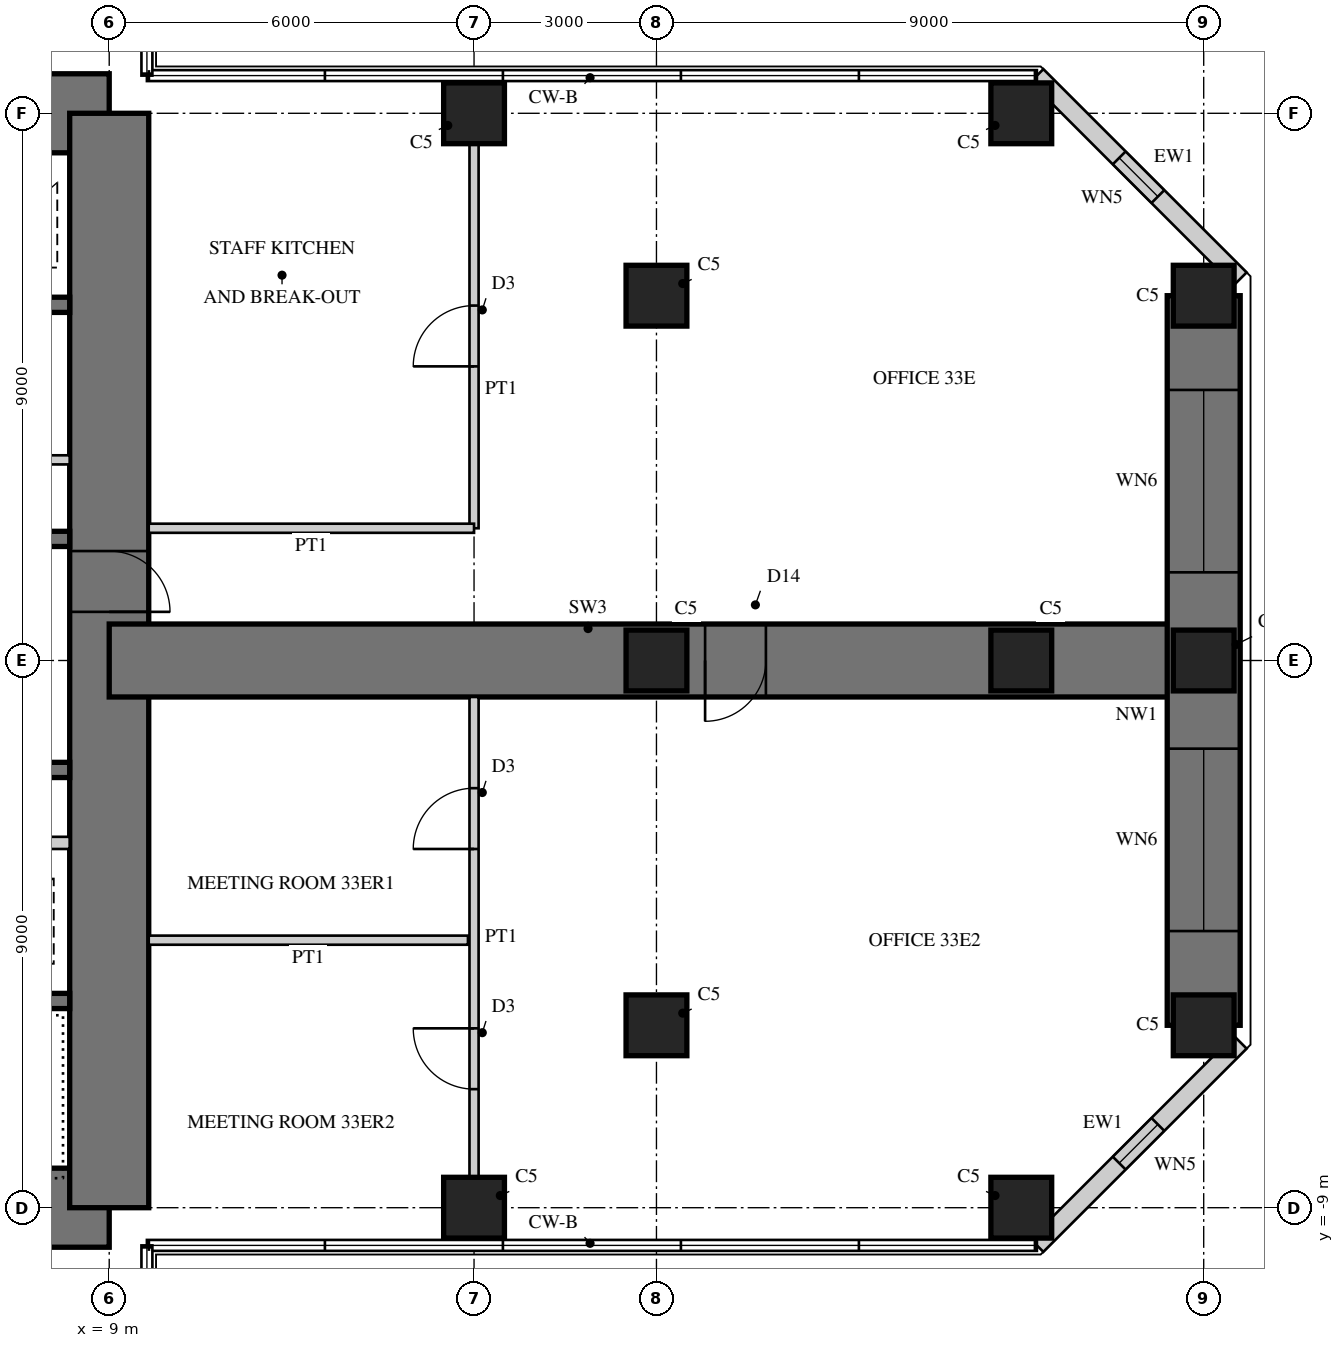
"""IFC4 building model, lengths in metres.
Left out: names, types, materials, properties, quantities, classifications, styles, units other than length and angle.
Written with IfcOpenShell. Run it as: python <this file> out.ifc"""

import sys

from ifc_helpers import new_model, si_unit, direction, frame, frame_2d, origin, origin_2d, place, context, subcontext, project, spatial, rectangle, hollow_rectangle, extrude, element, fill, save


model = new_model("IFC4")
c1 = context("Model", 3, precision=1e-05, world=origin(), true_north=direction((0.0, 1.0)))
c2 = subcontext(c1, "Body", "Model", "MODEL_VIEW")
j1 = project(units=[si_unit("LENGTHUNIT", "METRE"), si_unit("PLANEANGLEUNIT", "RADIAN")], contexts=[c1])
p1 = place(None, origin())
s1 = spatial("IfcSite", under=j1, at=p1, CompositionType="ELEMENT")
p2 = place(p1, origin())
s2 = spatial("IfcBuilding", under=s1, at=p2, CompositionType="ELEMENT")
p3 = place(p2, frame((0.0, 0.0, 136.5)))
s3 = spatial("IfcBuildingStorey", under=s2, at=p3, CompositionType="ELEMENT", Elevation=136.5)
p4 = place(p3, frame((9.0, 9.0, 0.0), z_axis=(0.0, 0.0, 1.0), x_axis=(-1.0, 0.0, 0.0)))
e1 = element("IfcWall", 1, at=p4, inside=s3, PredefinedType="SHEAR", context=c2, shape_type="SweptSolid", body=[
    extrude(rectangle(XDim=18.0, YDim=1.3, at=frame_2d((9.0, 0.0))), origin(), (0.0, 0.0, 1.0), 4.0),
])
p5 = place(p4, frame((9.8, 0.0, 0.0)))
e2 = element("IfcOpeningElement", 2, at=p5, cuts=e1, PredefinedType="OPENING", context=c2, shape_type="SweptSolid", body=[
    extrude(rectangle(XDim=1.0, YDim=2.4, at=frame_2d((0.5, 1.2))), frame((0.0, 0.66, 0.0), z_axis=(0.0, -1.0, 0.0), x_axis=(1.0, 0.0, 0.0)), (0.0, 0.0, 1.0), 1.32),
])
p6 = place(p3, frame((-9.0, -9.0, 0.0), z_axis=(0.0, 0.0, 1.0), x_axis=(1.0, 0.0, 0.0)))
e3 = element("IfcWall", 3, at=p6, inside=s3, PredefinedType="SHEAR", context=c2, shape_type="SweptSolid", body=[
    extrude(rectangle(XDim=18.0, YDim=1.3, at=frame_2d((9.0, 0.0))), origin(), (0.0, 0.0, 1.0), 4.0),
])
p7 = place(p6, frame((9.8, 0.0, 0.0)))
e4 = element("IfcOpeningElement", 4, at=p7, cuts=e3, PredefinedType="OPENING", context=c2, shape_type="SweptSolid", body=[
    extrude(rectangle(XDim=1.0, YDim=2.4, at=frame_2d((0.5, 1.2))), frame((0.0, 0.66, 0.0), z_axis=(0.0, -1.0, 0.0), x_axis=(1.0, 0.0, 0.0)), (0.0, 0.0, 1.0), 1.32),
])
p8 = place(p3, frame((9.0, -9.0, 0.0), z_axis=(0.0, 0.0, 1.0), x_axis=(0.0, 1.0, 0.0)))
e5 = element("IfcWall", 5, at=p8, inside=s3, PredefinedType="SHEAR", context=c2, shape_type="SweptSolid", body=[
    extrude(rectangle(XDim=18.0, YDim=1.3, at=frame_2d((9.0, 0.0))), origin(), (0.0, 0.0, 1.0), 4.0),
])
p9 = place(p8, frame((9.8, 0.0, 0.0)))
e6 = element("IfcOpeningElement", 6, at=p9, cuts=e5, PredefinedType="OPENING", context=c2, shape_type="SweptSolid", body=[
    extrude(rectangle(XDim=1.0, YDim=2.4, at=frame_2d((0.5, 1.2))), frame((0.0, 0.66, 0.0), z_axis=(0.0, -1.0, 0.0), x_axis=(1.0, 0.0, 0.0)), (0.0, 0.0, 1.0), 1.32),
])
p10 = place(p3, frame((1.925, 2.0, 0.0), z_axis=(0.0, 0.0, 1.0), x_axis=(1.0, 0.0, 0.0)))
e7 = element("IfcWall", 7, at=p10, inside=s3, PredefinedType="SHEAR", context=c2, shape_type="SweptSolid", body=[
    extrude(rectangle(XDim=6.425, YDim=0.25, at=frame_2d((3.212, 0.0))), origin(), (0.0, 0.0, 1.0), 4.0),
])
p11 = place(p3, frame((1.925, 5.85, 0.0), z_axis=(0.0, 0.0, 1.0), x_axis=(1.0, 0.0, 0.0)))
e8 = element("IfcWall", 8, at=p11, inside=s3, PredefinedType="SHEAR", context=c2, shape_type="SweptSolid", body=[
    extrude(rectangle(XDim=6.425, YDim=0.25, at=frame_2d((3.212, 0.0))), origin(), (0.0, 0.0, 1.0), 4.0),
])
p12 = place(p11, frame((0.454, 0.0, 0.0)))
e9 = element("IfcOpeningElement", 9, at=p12, cuts=e8, PredefinedType="OPENING", context=c2, shape_type="SweptSolid", body=[
    extrude(rectangle(XDim=1.1, YDim=2.2, at=frame_2d((0.55, 1.1))), frame((0.0, 0.135, 0.0), z_axis=(0.0, -1.0, 0.0), x_axis=(1.0, 0.0, 0.0)), (0.0, 0.0, 1.0), 0.27),
])
p13 = place(p11, frame((2.663, 0.0, 0.0)))
e10 = element("IfcOpeningElement", 10, at=p13, cuts=e8, PredefinedType="OPENING", context=c2, shape_type="SweptSolid", body=[
    extrude(rectangle(XDim=1.1, YDim=2.2, at=frame_2d((0.55, 1.1))), frame((0.0, 0.135, 0.0), z_axis=(0.0, -1.0, 0.0), x_axis=(1.0, 0.0, 0.0)), (0.0, 0.0, 1.0), 0.27),
])
p14 = place(p11, frame((4.871, 0.0, 0.0)))
e11 = element("IfcOpeningElement", 11, at=p14, cuts=e8, PredefinedType="OPENING", context=c2, shape_type="SweptSolid", body=[
    extrude(rectangle(XDim=1.1, YDim=2.2, at=frame_2d((0.55, 1.1))), frame((0.0, 0.135, 0.0), z_axis=(0.0, -1.0, 0.0), x_axis=(1.0, 0.0, 0.0)), (0.0, 0.0, 1.0), 0.27),
])
p15 = place(p3, frame((1.925, 3.3, 0.0), z_axis=(0.0, 0.0, 1.0), x_axis=(1.0, 0.0, 0.0)))
e12 = element("IfcWall", 12, at=p15, inside=s3, PredefinedType="PARTITIONING", context=c2, shape_type="SweptSolid", body=[
    extrude(rectangle(XDim=6.425, YDim=0.15, at=frame_2d((3.212, 0.0))), origin(), (0.0, 0.0, 1.0), 4.0),
])
p16 = place(p15, frame((0.075, 0.0, 0.0)))
e13 = element("IfcOpeningElement", 13, at=p16, cuts=e12, PredefinedType="OPENING", context=c2, shape_type="SweptSolid", body=[
    extrude(rectangle(XDim=0.8, YDim=2.1, at=frame_2d((0.4, 1.05))), frame((0.0, 0.085, 0.0), z_axis=(0.0, -1.0, 0.0), x_axis=(1.0, 0.0, 0.0)), (0.0, 0.0, 1.0), 0.17),
])
p17 = place(p15, frame((3.675, 0.0, 0.0)))
e14 = element("IfcOpeningElement", 14, at=p17, cuts=e12, PredefinedType="OPENING", context=c2, shape_type="SweptSolid", body=[
    extrude(rectangle(XDim=0.8, YDim=2.1, at=frame_2d((0.4, 1.05))), frame((0.0, 0.085, 0.0), z_axis=(0.0, -1.0, 0.0), x_axis=(1.0, 0.0, 0.0)), (0.0, 0.0, 1.0), 0.17),
])
p18 = place(p3, frame((2.125, -1.8, 0.0), z_axis=(0.0, 0.0, 1.0), x_axis=(1.0, 0.0, 0.0)))
e15 = element("IfcWall", 15, at=p18, inside=s3, PredefinedType="SHEAR", context=c2, shape_type="SweptSolid", body=[
    extrude(rectangle(XDim=6.225, YDim=0.25, at=frame_2d((3.113, 0.0))), origin(), (0.0, 0.0, 1.0), 4.0),
])
p19 = place(p3, frame((2.125, -5.6, 0.0), z_axis=(0.0, 0.0, 1.0), x_axis=(1.0, 0.0, 0.0)))
e16 = element("IfcWall", 16, at=p19, inside=s3, PredefinedType="SHEAR", context=c2, shape_type="SweptSolid", body=[
    extrude(rectangle(XDim=6.225, YDim=0.25, at=frame_2d((3.113, 0.0))), origin(), (0.0, 0.0, 1.0), 4.0),
])
p20 = place(p19, frame((0.175, 0.0, 0.0)))
e17 = element("IfcOpeningElement", 17, at=p20, cuts=e16, PredefinedType="OPENING", context=c2, shape_type="SweptSolid", body=[
    extrude(rectangle(XDim=1.0, YDim=2.1, at=frame_2d((0.5, 1.05))), frame((0.0, 0.135, 0.0), z_axis=(0.0, -1.0, 0.0), x_axis=(1.0, 0.0, 0.0)), (0.0, 0.0, 1.0), 0.27),
])
p21 = place(p3, frame((5.725, -3.0, 0.0), z_axis=(0.0, 0.0, 1.0), x_axis=(1.0, 0.0, 0.0)))
e18 = element("IfcWall", 18, at=p21, inside=s3, PredefinedType="PARTITIONING", context=c2, shape_type="SweptSolid", body=[
    extrude(rectangle(XDim=2.625, YDim=0.2, at=frame_2d((1.312, 0.0))), origin(), (0.0, 0.0, 1.0), 4.0),
])
p22 = place(p3, frame((9.0, 0.0, 0.0), z_axis=(0.0, 0.0, 1.0), x_axis=(1.0, 0.0, 0.0)))
e19 = element("IfcWall", 19, at=p22, inside=s3, PredefinedType="SHEAR", context=c2, shape_type="SweptSolid", body=[
    extrude(rectangle(XDim=18.0, YDim=1.2, at=frame_2d((9.0, 0.0))), origin(), (0.0, 0.0, 1.0), 4.0),
])
p23 = place(p22, frame((9.8, 0.0, 0.0)))
e20 = element("IfcOpeningElement", 20, at=p23, cuts=e19, PredefinedType="OPENING", context=c2, shape_type="SweptSolid", body=[
    extrude(rectangle(XDim=1.0, YDim=2.2, at=frame_2d((0.5, 1.1))), frame((0.0, 0.61, 0.0), z_axis=(0.0, -1.0, 0.0), x_axis=(1.0, 0.0, 0.0)), (0.0, 0.0, 1.0), 1.22),
])
p24 = place(p3, frame((27.0, -6.0, 0.0), z_axis=(0.0, 0.0, 1.0), x_axis=(0.0, 1.0, 0.0)))
e21 = element("IfcWall", 21, at=p24, inside=s3, PredefinedType="SHEAR", context=c2, shape_type="SweptSolid", body=[
    extrude(rectangle(XDim=12.0, YDim=1.2, at=frame_2d((6.0, 0.0))), origin(), (0.0, 0.0, 1.0), 4.0),
])
p25 = place(p24, frame((1.55, 0.0, 0.6)))
e22 = element("IfcOpeningElement", 22, at=p25, cuts=e21, PredefinedType="OPENING", context=c2, shape_type="SweptSolid", body=[
    extrude(rectangle(XDim=3.0, YDim=2.4, at=frame_2d((1.5, 1.2))), frame((0.0, 0.61, 0.0), z_axis=(0.0, -1.0, 0.0), x_axis=(1.0, 0.0, 0.0)), (0.0, 0.0, 1.0), 1.22),
])
p26 = place(p24, frame((7.45, 0.0, 0.6)))
e23 = element("IfcOpeningElement", 23, at=p26, cuts=e21, PredefinedType="OPENING", context=c2, shape_type="SweptSolid", body=[
    extrude(rectangle(XDim=3.0, YDim=2.4, at=frame_2d((1.5, 1.2))), frame((0.0, 0.61, 0.0), z_axis=(0.0, -1.0, 0.0), x_axis=(1.0, 0.0, 0.0)), (0.0, 0.0, 1.0), 1.22),
])
for number, where, z_axis, x_axis in (
    (24, (15.0, -9.0, 0.0), (0.0, 0.0, 1.0), (1.0, 0.0, 0.0)),
    (25, (24.0, -9.0, 0.0), (0.0, 0.0, 1.0), (1.0, 0.0, 0.0)),
    (26, (15.0, 9.0, 0.0), (0.0, 0.0, 1.0), (1.0, 0.0, 0.0)),
    (27, (24.0, 9.0, 0.0), (0.0, 0.0, 1.0), (1.0, 0.0, 0.0)),
    (28, (27.0, -6.0, 0.0), (0.0, 0.0, 1.0), (1.0, 0.0, 0.0)),
    (29, (27.0, 0.0, 0.0), (0.0, 0.0, 1.0), (1.0, 0.0, 0.0)),
    (30, (27.0, 6.0, 0.0), (0.0, 0.0, 1.0), (1.0, 0.0, 0.0)),
    (31, (18.0, -6.0, 0.0), (0.0, 0.0, 1.0), (1.0, 0.0, 0.0)),
    (32, (18.0, 0.0, 0.0), (0.0, 0.0, 1.0), (1.0, 0.0, 0.0)),
    (33, (18.0, 6.0, 0.0), (0.0, 0.0, 1.0), (1.0, 0.0, 0.0)),
    (34, (24.0, 0.0, 0.0), (0.0, 0.0, 1.0), (1.0, 0.0, 0.0)),
):
    element("IfcColumn", number, at=place(p3, frame(where, z_axis=z_axis, x_axis=x_axis)), inside=s3, PredefinedType="COLUMN", context=c2, shape_type="SweptSolid", body=[
        extrude(rectangle(XDim=1.0, YDim=1.0, at=origin_2d()), origin(), (0.0, 0.0, 1.0), 4.0),
    ])
p27 = place(p3, frame((24.257, -9.62, 0.0), z_axis=(0.0, 0.0, 1.0), x_axis=(0.707106781187, 0.707106781187, 0.0)))
e35 = element("IfcWall", 35, at=p27, inside=s3, PredefinedType="SOLIDWALL", context=c2, shape_type="SweptSolid", body=[
    extrude(rectangle(XDim=4.728, YDim=0.3, at=frame_2d((2.364, 0.0))), origin(), (0.0, 0.0, 1.0), 3.8),
])
p28 = place(p27, frame((1.914, 0.0, 0.3)))
e36 = element("IfcOpeningElement", 36, at=p28, cuts=e35, PredefinedType="OPENING", context=c2, shape_type="SweptSolid", body=[
    extrude(rectangle(XDim=0.9, YDim=2.4, at=frame_2d((0.45, 1.2))), frame((0.0, 0.16, 0.0), z_axis=(0.0, -1.0, 0.0), x_axis=(1.0, 0.0, 0.0)), (0.0, 0.0, 1.0), 0.32),
])
p29 = place(p3, frame((27.6, 6.277, 0.0), z_axis=(0.0, 0.0, 1.0), x_axis=(-0.707106781187, 0.707106781187, 0.0)))
e37 = element("IfcWall", 37, at=p29, inside=s3, PredefinedType="SOLIDWALL", context=c2, shape_type="SweptSolid", body=[
    extrude(rectangle(XDim=4.728, YDim=0.3, at=frame_2d((2.364, 0.0))), origin(), (0.0, 0.0, 1.0), 3.8),
])
p30 = place(p29, frame((1.914, 0.0, 0.3)))
e38 = element("IfcOpeningElement", 38, at=p30, cuts=e37, PredefinedType="OPENING", context=c2, shape_type="SweptSolid", body=[
    extrude(rectangle(XDim=0.9, YDim=2.4, at=frame_2d((0.45, 1.2))), frame((0.0, 0.16, 0.0), z_axis=(0.0, -1.0, 0.0), x_axis=(1.0, 0.0, 0.0)), (0.0, 0.0, 1.0), 0.32),
])
p31 = place(p3, frame((15.0, 2.175, 0.0), z_axis=(0.0, 0.0, 1.0), x_axis=(0.0, 1.0, 0.0)))
e39 = element("IfcWall", 39, at=p31, inside=s3, PredefinedType="PARTITIONING", context=c2, shape_type="SweptSolid", body=[
    extrude(rectangle(XDim=6.325, YDim=0.15, at=frame_2d((3.163, 0.0))), origin(), (0.0, 0.0, 1.0), 3.0),
])
p32 = place(p31, frame((2.663, 0.0, 0.0)))
e40 = element("IfcOpeningElement", 40, at=p32, cuts=e39, PredefinedType="OPENING", context=c2, shape_type="SweptSolid", body=[
    extrude(rectangle(XDim=1.0, YDim=2.1, at=frame_2d((0.5, 1.05))), frame((0.0, 0.085, 0.0), z_axis=(0.0, -1.0, 0.0), x_axis=(1.0, 0.0, 0.0)), (0.0, 0.0, 1.0), 0.17),
])
p33 = place(p3, frame((9.65, 2.175, 0.0), z_axis=(0.0, 0.0, 1.0), x_axis=(1.0, 0.0, 0.0)))
e41 = element("IfcWall", 41, at=p33, inside=s3, PredefinedType="PARTITIONING", context=c2, shape_type="SweptSolid", body=[
    extrude(rectangle(XDim=5.35, YDim=0.15, at=frame_2d((2.675, 0.0))), origin(), (0.0, 0.0, 1.0), 3.8),
])
p34 = place(p3, frame((15.0, -8.5, 0.0), z_axis=(0.0, 0.0, 1.0), x_axis=(0.0, 1.0, 0.0)))
e42 = element("IfcWall", 42, at=p34, inside=s3, PredefinedType="PARTITIONING", context=c2, shape_type="SweptSolid", body=[
    extrude(rectangle(XDim=7.9, YDim=0.15, at=frame_2d((3.95, 0.0))), origin(), (0.0, 0.0, 1.0), 3.0),
])
p35 = place(p34, frame((1.45, 0.0, 0.0)))
e43 = element("IfcOpeningElement", 43, at=p35, cuts=e42, PredefinedType="OPENING", context=c2, shape_type="SweptSolid", body=[
    extrude(rectangle(XDim=1.0, YDim=2.1, at=frame_2d((0.5, 1.05))), frame((0.0, 0.085, 0.0), z_axis=(0.0, -1.0, 0.0), x_axis=(1.0, 0.0, 0.0)), (0.0, 0.0, 1.0), 0.17),
])
p36 = place(p34, frame((5.4, 0.0, 0.0)))
e44 = element("IfcOpeningElement", 44, at=p36, cuts=e42, PredefinedType="OPENING", context=c2, shape_type="SweptSolid", body=[
    extrude(rectangle(XDim=1.0, YDim=2.1, at=frame_2d((0.5, 1.05))), frame((0.0, 0.085, 0.0), z_axis=(0.0, -1.0, 0.0), x_axis=(1.0, 0.0, 0.0)), (0.0, 0.0, 1.0), 0.17),
])
p37 = place(p3, frame((9.65, -4.6, 0.0), z_axis=(0.0, 0.0, 1.0), x_axis=(1.0, 0.0, 0.0)))
e45 = element("IfcWall", 45, at=p37, inside=s3, PredefinedType="PARTITIONING", context=c2, shape_type="SweptSolid", body=[
    extrude(rectangle(XDim=5.25, YDim=0.15, at=frame_2d((2.625, 0.0))), origin(), (0.0, 0.0, 1.0), 3.8),
])
p38 = place(p28, origin())
e46 = element("IfcWindow", 46, at=p38, inside=s3, PartitioningType="SINGLE_PANEL", PredefinedType="WINDOW", context=c2, shape_type="SweptSolid", body=[
    extrude(hollow_rectangle(XDim=0.9, YDim=2.4, WallThickness=0.06, at=frame_2d((0.45, 1.2))), frame((0.0, 0.03, 0.0), z_axis=(0.0, -1.0, 0.0), x_axis=(1.0, 0.0, 0.0)), (0.0, 0.0, 1.0), 0.06),
    extrude(rectangle(XDim=0.779, YDim=2.279, at=frame_2d((0.45, 1.2))), frame((0.0, 0.03, 0.0), z_axis=(0.0, -1.0, 0.0), x_axis=(1.0, 0.0, 0.0)), (0.0, 0.0, 1.0), 0.06),
])
fill(e36, e46)
p39 = place(p25, origin())
e47 = element("IfcWindow", 47, at=p39, inside=s3, PartitioningType="SINGLE_PANEL", PredefinedType="WINDOW", context=c2, shape_type="SweptSolid", body=[
    extrude(hollow_rectangle(XDim=3.0, YDim=2.4, WallThickness=0.06, at=frame_2d((1.5, 1.2))), frame((0.0, 0.03, 0.0), z_axis=(0.0, -1.0, 0.0), x_axis=(1.0, 0.0, 0.0)), (0.0, 0.0, 1.0), 0.06),
    extrude(rectangle(XDim=2.879, YDim=2.279, at=frame_2d((1.5, 1.2))), frame((0.0, 0.03, 0.0), z_axis=(0.0, -1.0, 0.0), x_axis=(1.0, 0.0, 0.0)), (0.0, 0.0, 1.0), 0.06),
])
fill(e22, e47)
p40 = place(p26, origin())
e48 = element("IfcWindow", 48, at=p40, inside=s3, PartitioningType="SINGLE_PANEL", PredefinedType="WINDOW", context=c2, shape_type="SweptSolid", body=[
    extrude(hollow_rectangle(XDim=3.0, YDim=2.4, WallThickness=0.06, at=frame_2d((1.5, 1.2))), frame((0.0, 0.03, 0.0), z_axis=(0.0, -1.0, 0.0), x_axis=(1.0, 0.0, 0.0)), (0.0, 0.0, 1.0), 0.06),
    extrude(rectangle(XDim=2.879, YDim=2.279, at=frame_2d((1.5, 1.2))), frame((0.0, 0.03, 0.0), z_axis=(0.0, -1.0, 0.0), x_axis=(1.0, 0.0, 0.0)), (0.0, 0.0, 1.0), 0.06),
])
fill(e23, e48)
p41 = place(p30, origin())
e49 = element("IfcWindow", 49, at=p41, inside=s3, PartitioningType="SINGLE_PANEL", PredefinedType="WINDOW", context=c2, shape_type="SweptSolid", body=[
    extrude(hollow_rectangle(XDim=0.9, YDim=2.4, WallThickness=0.06, at=frame_2d((0.45, 1.2))), frame((0.0, 0.03, 0.0), z_axis=(0.0, -1.0, 0.0), x_axis=(1.0, 0.0, 0.0)), (0.0, 0.0, 1.0), 0.06),
    extrude(rectangle(XDim=0.779, YDim=2.279, at=frame_2d((0.45, 1.2))), frame((0.0, 0.03, 0.0), z_axis=(0.0, -1.0, 0.0), x_axis=(1.0, 0.0, 0.0)), (0.0, 0.0, 1.0), 0.06),
])
fill(e38, e49)
p42 = place(p32, origin())
e50 = element("IfcDoor", 50, at=p42, inside=s3, OperationType="SINGLE_SWING_LEFT", PredefinedType="DOOR", context=c2, shape_type="SweptSolid", body=[
    extrude(rectangle(XDim=1.0, YDim=2.1, at=frame_2d((0.5, 1.05))), frame((0.0, 0.025, 0.0), z_axis=(0.0, -1.0, 0.0), x_axis=(1.0, 0.0, 0.0)), (0.0, 0.0, 1.0), 0.05),
])
fill(e40, e50)
p43 = place(p35, origin())
e51 = element("IfcDoor", 51, at=p43, inside=s3, OperationType="SINGLE_SWING_RIGHT", PredefinedType="DOOR", context=c2, shape_type="SweptSolid", body=[
    extrude(rectangle(XDim=1.0, YDim=2.1, at=frame_2d((0.5, 1.05))), frame((0.0, 0.025, 0.0), z_axis=(0.0, -1.0, 0.0), x_axis=(1.0, 0.0, 0.0)), (0.0, 0.0, 1.0), 0.05),
])
fill(e43, e51)
p44 = place(p36, origin())
e52 = element("IfcDoor", 52, at=p44, inside=s3, OperationType="SINGLE_SWING_LEFT", PredefinedType="DOOR", context=c2, shape_type="SweptSolid", body=[
    extrude(rectangle(XDim=1.0, YDim=2.1, at=frame_2d((0.5, 1.05))), frame((0.0, 0.025, 0.0), z_axis=(0.0, -1.0, 0.0), x_axis=(1.0, 0.0, 0.0)), (0.0, 0.0, 1.0), 0.05),
])
fill(e44, e52)
p45 = place(p23, frame((1.0, 0.0, 0.0), z_axis=(0.0, 0.0, 1.0), x_axis=(-1.0, 0.0, 0.0)))
e53 = element("IfcDoor", 53, at=p45, inside=s3, OperationType="SINGLE_SWING_RIGHT", PredefinedType="DOOR", context=c2, shape_type="SweptSolid", body=[
    extrude(rectangle(XDim=1.0, YDim=2.2, at=frame_2d((0.5, 1.1))), frame((0.0, 0.025, 0.0), z_axis=(0.0, -1.0, 0.0), x_axis=(1.0, 0.0, 0.0)), (0.0, 0.0, 1.0), 0.05),
])
fill(e20, e53)
p46 = place(p9, frame((1.0, 0.0, 0.0), z_axis=(0.0, 0.0, 1.0), x_axis=(-1.0, 0.0, 0.0)))
e54 = element("IfcDoor", 54, at=p46, inside=s3, OperationType="SINGLE_SWING_RIGHT", PredefinedType="DOOR", context=c2, shape_type="SweptSolid", body=[
    extrude(rectangle(XDim=1.0, YDim=2.4, at=frame_2d((0.5, 1.2))), frame((0.0, -0.005, 0.0), z_axis=(0.0, -1.0, 0.0), x_axis=(1.0, 0.0, 0.0)), (0.0, 0.0, 1.0), 0.05),
])
fill(e6, e54)
save(model, sys.argv[1])
